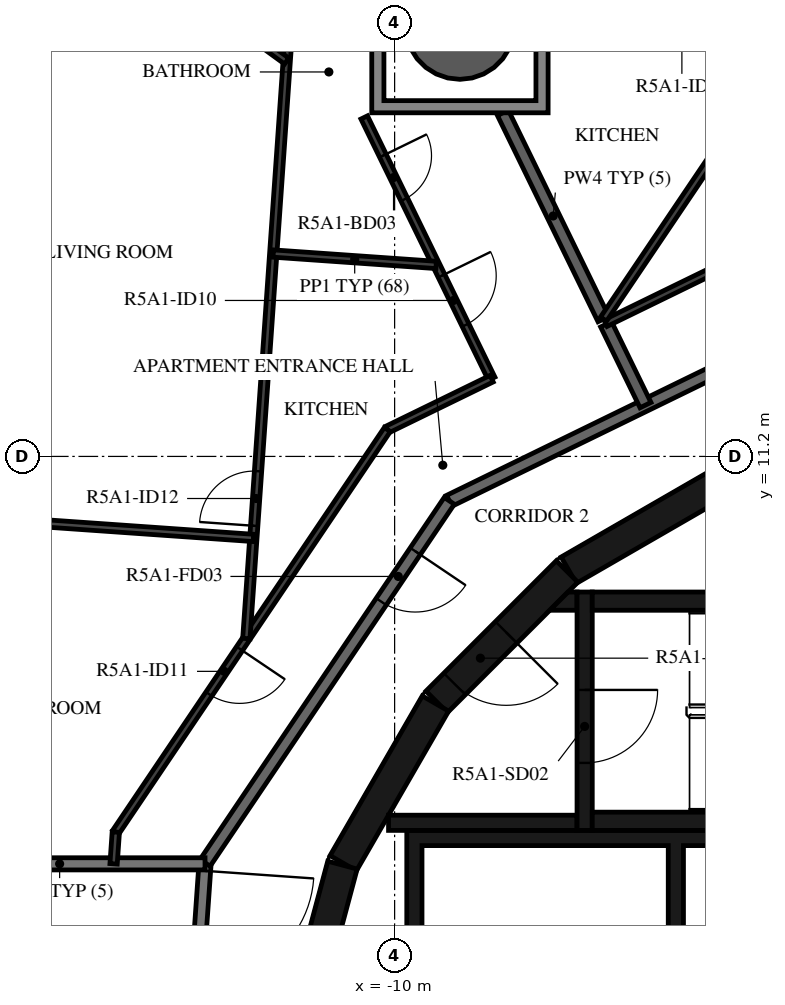
"""IFC4 building model, lengths in metres.
Left out: names, types, materials, properties, quantities, classifications, styles, units other than length and angle.
Written with IfcOpenShell. Run it as: python <this file> out.ifc"""

import sys

from ifc_helpers import new_model, si_unit, direction, frame, frame_2d, origin, origin_2d, place, context, subcontext, project, spatial, polyline, rectangle, hollow_circle, outline, extrude, element, fill, save


model = new_model("IFC4")
c1 = context("Model", 3, precision=1e-05, world=origin(), true_north=direction((0.0, 1.0)))
c2 = subcontext(c1, "Body", "Model", "MODEL_VIEW")
j1 = project(units=[si_unit("LENGTHUNIT", "METRE"), si_unit("PLANEANGLEUNIT", "RADIAN")], contexts=[c1])
p1 = place(None, origin())
s1 = spatial("IfcSite", under=j1, at=p1, CompositionType="ELEMENT")
p2 = place(p1, origin())
s2 = spatial("IfcBuilding", under=s1, at=p2, CompositionType="ELEMENT")
p3 = place(p2, frame((0.0, 0.0, 191.9)))
s3 = spatial("IfcBuildingStorey", under=s2, at=p3, CompositionType="ELEMENT", Elevation=191.9)
p4 = place(p3, frame((-8.926, 18.301, -0.38), z_axis=(0.0, 0.0, 1.0), x_axis=(1.0, 0.0, 0.0)))
e1 = element("IfcColumn", 1, at=p4, inside=s3, PredefinedType="COLUMN", context=c2, shape_type="SweptSolid", body=[
    extrude(hollow_circle(Radius=0.9, WallThickness=0.04, at=origin_2d()), origin(), (0.0, 0.0, 1.0), 3.5),
])
p5 = place(p3, frame((-4.51, 10.845, 0.0), z_axis=(0.0, 0.0, 1.0), x_axis=(-0.865975092491, -0.500087131594, 0.0)))
e2 = element("IfcWall", 2, at=p5, inside=s3, PredefinedType="SHEAR", context=c2, shape_type="SweptSolid", body=[
    extrude(rectangle(XDim=3.033, YDim=0.5, at=frame_2d((1.516, 0.0))), origin(), (0.0, 0.0, 1.0), 3.12),
])
p6 = place(p3, frame((-7.164, 9.308, 0.0), z_axis=(0.0, 0.0, 1.0), x_axis=(-0.707106781187, -0.707106781187, 0.0)))
e3 = element("IfcWall", 3, at=p6, inside=s3, PredefinedType="SHEAR", context=c2, shape_type="SweptSolid", body=[
    extrude(rectangle(XDim=3.032, YDim=0.5, at=frame_2d((1.516, 0.0))), origin(), (0.0, 0.0, 1.0), 3.12),
])
p7 = place(p6, frame((1.416, 0.0, 0.0)))
e4 = element("IfcOpeningElement", 4, at=p7, cuts=e3, PredefinedType="OPENING", context=c2, shape_type="SweptSolid", body=[
    extrude(rectangle(XDim=1.2, YDim=2.1, at=frame_2d((0.6, 1.05))), frame((0.0, 0.26, 0.0), z_axis=(0.0, -1.0, 0.0), x_axis=(1.0, 0.0, 0.0)), (0.0, 0.0, 1.0), 0.52),
])
for number, where, z_axis, x_axis in (
    (5, (-9.329, 7.137, 0.0), (0.0, 0.0, 1.0), (-0.5, -0.866, 0.0)),
    (6, (-10.858, 4.479, 0.0), (0.0, 0.0, 1.0), (-0.259, -0.966, 0.0)),
):
    element("IfcWall", number, at=place(p3, frame(where, z_axis=z_axis, x_axis=x_axis)), inside=s3, PredefinedType="SHEAR", context=c2, shape_type="SweptSolid", body=[
        extrude(rectangle(XDim=3.033, YDim=0.5, at=frame_2d((1.516, 0.0))), origin(), (0.0, 0.0, 1.0), 3.12),
    ])
for number, where, z_axis, x_axis in (
    (7, (-6.75, 5.2, 0.0), (0.0, 0.0, 1.0), (1.0, 0.0, 0.0)),
    (8, (-6.75, 8.82, 0.0), (0.0, 0.0, 1.0), (1.0, 0.0, 0.0)),
):
    element("IfcWall", number, at=place(p3, frame(where, z_axis=z_axis, x_axis=x_axis)), inside=s3, PredefinedType="SHEAR", context=c2, shape_type="SweptSolid", body=[
        extrude(rectangle(XDim=6.75, YDim=0.3, at=frame_2d((3.375, 0.0))), origin(), (0.0, 0.0, 1.0), 3.12),
    ])
p8 = place(p3, frame((-6.875, 8.97, 0.0), z_axis=(0.0, 0.0, 1.0), x_axis=(0.0, -1.0, 0.0)))
e9 = element("IfcWall", 9, at=p8, inside=s3, PredefinedType="SHEAR", context=c2, shape_type="SweptSolid", body=[
    extrude(rectangle(XDim=3.92, YDim=0.25, at=frame_2d((1.96, 0.0))), origin(), (0.0, 0.0, 1.0), 3.12),
])
p9 = place(p8, frame((1.61, 0.0, 0.0)))
e10 = element("IfcOpeningElement", 10, at=p9, cuts=e9, PredefinedType="OPENING", context=c2, shape_type="SweptSolid", body=[
    extrude(rectangle(XDim=1.2, YDim=2.1, at=frame_2d((0.6, 1.05))), frame((0.0, 0.135, 0.0), z_axis=(0.0, -1.0, 0.0), x_axis=(1.0, 0.0, 0.0)), (0.0, 0.0, 1.0), 0.27),
])
p10 = place(p3, frame((-7.0, 5.175, 0.0), z_axis=(0.0, 0.0, 1.0), x_axis=(-1.0, 0.0, 0.0)))
e11 = element("IfcWall", 11, at=p10, inside=s3, PredefinedType="SHEAR", context=c2, shape_type="SweptSolid", body=[
    extrude(rectangle(XDim=3.1, YDim=0.25, at=frame_2d((1.55, 0.0))), origin(), (0.0, 0.0, 1.0), 3.12),
])
p11 = place(p3, origin())
e12 = element("IfcWall", 12, at=p11, inside=s3, PredefinedType="SHEAR", context=c2, shape_type="SweptSolid", body=[
    extrude(outline(polyline([(-7.148, 8.97), (-7.0, 8.97), (-7.0, 8.67), (-7.448, 8.67), (-7.148, 8.97)])), origin(), (0.0, 0.0, 1.0), 3.12),
])
p12 = place(p3, origin())
e13 = element("IfcWall", 13, at=p12, inside=s3, PredefinedType="SHEAR", context=c2, shape_type="SweptSolid", body=[
    extrude(outline(polyline([(-9.55, 4.8), (-5.5, 4.8), (-5.5, 1.9), (-5.25, 1.9), (-5.25, 4.8), (-1.2, 4.8), (-1.2, 1.9), (-0.95, 1.9), (-0.95, 4.8), (0.95, 4.8), (0.95, 1.9), (1.2, 1.9), (1.2, 4.8), (3.1, 4.8), (3.1, 1.9), (3.35, 1.9), (3.35, 4.8), (5.25, 4.8), (5.25, 1.9), (5.5, 1.9), (5.5, 4.8), (7.4, 4.8), (7.4, 1.9), (7.65, 1.9), (7.65, 4.8), (9.55, 4.8), (9.55, 1.9), (9.8, 1.9), (9.8, 4.8), (9.8, 5.05), (-9.8, 5.05), (-9.8, 4.8), (-9.8, 1.9), (-9.55, 1.9), (-9.55, 4.8)])), origin(), (0.0, 0.0, 1.0), 3.12),
])
p13 = place(p3, frame((-13.118, 4.5, 0.0), z_axis=(0.0, 0.0, 1.0), x_axis=(-0.069746872611, -0.99756472159, 0.0)))
e14 = element("IfcWall", 14, at=p13, inside=s3, PredefinedType="STANDARD", context=c2, shape_type="SweptSolid", body=[
    extrude(rectangle(XDim=3.574, YDim=0.2, at=frame_2d((1.787, 0.0))), origin(), (0.0, 0.0, 1.0), 3.12),
])
p14 = place(p13, frame((0.115, 0.0, 0.0)))
e15 = element("IfcOpeningElement", 15, at=p14, cuts=e14, PredefinedType="OPENING", context=c2, shape_type="SweptSolid", body=[
    extrude(rectangle(XDim=1.8, YDim=2.1, at=frame_2d((0.9, 1.05))), frame((0.0, 0.11, 0.0), z_axis=(0.0, -1.0, 0.0), x_axis=(1.0, 0.0, 0.0)), (0.0, 0.0, 1.0), 0.22),
])
p15 = place(p3, frame((-2.647, 13.618, 0.0), z_axis=(0.0, 0.0, 1.0), x_axis=(-0.898796543751, -0.438366026218, 0.0)))
e16 = element("IfcWall", 16, at=p15, inside=s3, PredefinedType="STANDARD", context=c2, shape_type="SweptSolid", body=[
    extrude(rectangle(XDim=7.181, YDim=0.2, at=frame_2d((3.591, 0.0))), origin(), (0.0, 0.0, 1.0), 3.12),
])
p16 = place(p3, frame((-9.101, 10.47, 0.0), z_axis=(0.0, 0.0, 1.0), x_axis=(-0.559195469534, -0.829035841718, 0.0)))
e17 = element("IfcWall", 17, at=p16, inside=s3, PredefinedType="STANDARD", context=c2, shape_type="SweptSolid", body=[
    extrude(rectangle(XDim=7.181, YDim=0.2, at=frame_2d((3.591, 0.0))), origin(), (0.0, 0.0, 1.0), 3.12),
])
p17 = place(p16, frame((1.0, 0.0, 0.0)))
e18 = element("IfcOpeningElement", 18, at=p17, cuts=e17, PredefinedType="OPENING", context=c2, shape_type="SweptSolid", body=[
    extrude(rectangle(XDim=1.0, YDim=2.1, at=frame_2d((0.5, 1.05))), frame((0.0, 0.11, 0.0), z_axis=(0.0, -1.0, 0.0), x_axis=(1.0, 0.0, 0.0)), (0.0, 0.0, 1.0), 0.22),
])
p18 = place(p3, frame((-13.118, 4.5, 0.0), z_axis=(0.0, 0.0, 1.0), x_axis=(-1.0, 0.0, 0.0)))
e19 = element("IfcWall", 19, at=p18, inside=s3, PredefinedType="STANDARD", context=c2, shape_type="SweptSolid", body=[
    extrude(rectangle(XDim=4.782, YDim=0.2, at=frame_2d((2.391, 0.0))), origin(), (0.0, 0.0, 1.0), 3.12),
])
p19 = place(p3, frame((-6.522, 13.373, 0.0), z_axis=(0.0, 0.0, 1.0), x_axis=(0.438277270821, -0.8988398266, 0.0)))
e20 = element("IfcWall", 20, at=p19, inside=s3, PredefinedType="STANDARD", context=c2, shape_type="SweptSolid", body=[
    extrude(rectangle(XDim=1.479, YDim=0.2, at=frame_2d((0.74, 0.0))), origin(), (0.0, 0.0, 1.0), 3.12),
])
p20 = place(p3, frame((-8.219, 16.851, 0.0), z_axis=(0.0, 0.0, 1.0), x_axis=(0.438291091101, -0.898833087654, 0.0)))
e21 = element("IfcWall", 21, at=p20, inside=s3, PredefinedType="STANDARD", context=c2, shape_type="SweptSolid", body=[
    extrude(rectangle(XDim=3.774, YDim=0.2, at=frame_2d((1.887, 0.0))), origin(), (0.0, 0.0, 1.0), 3.12),
])
p21 = place(p3, frame((-2.943, 15.142, 0.0), z_axis=(0.0, 0.0, 1.0), x_axis=(-0.89881075705, -0.438336883014, 0.0)))
e22 = element("IfcWall", 22, at=p21, inside=s3, PredefinedType="PARTITIONING", context=c2, shape_type="SweptSolid", body=[
    extrude(rectangle(XDim=3.992, YDim=0.12, at=frame_2d((1.996, 0.0))), origin(), (0.0, 0.0, 1.0), 3.12),
])
p22 = place(p3, frame((-7.476, 19.735, 0.0), z_axis=(0.0, 0.0, 1.0), x_axis=(0.829035412992, -0.559196105142, 0.0)))
e23 = element("IfcWall", 23, at=p22, inside=s3, PredefinedType="PARTITIONING", context=c2, shape_type="SweptSolid", body=[
    extrude(rectangle(XDim=8.531, YDim=0.12, at=frame_2d((4.266, 0.0))), origin(), (0.0, 0.0, 1.0), 3.12),
])
p23 = place(p22, frame((2.204, 0.0, 0.0)))
e24 = element("IfcOpeningElement", 24, at=p23, cuts=e23, PredefinedType="OPENING", context=c2, shape_type="SweptSolid", body=[
    extrude(rectangle(XDim=0.9, YDim=2.1, at=frame_2d((0.45, 1.05))), frame((0.0, 0.07, 0.0), z_axis=(0.0, -1.0, 0.0), x_axis=(1.0, 0.0, 0.0)), (0.0, 0.0, 1.0), 0.14),
])
p24 = place(p3, frame((-3.939, 17.35, 0.0), z_axis=(0.0, 0.0, 1.0), x_axis=(-0.559193216274, -0.829037361566, 0.0)))
e25 = element("IfcWall", 25, at=p24, inside=s3, PredefinedType="PARTITIONING", context=c2, shape_type="SweptSolid", body=[
    extrude(rectangle(XDim=4.694, YDim=0.12, at=frame_2d((2.347, 0.0))), origin(), (0.0, 0.0, 1.0), 3.12),
])
p25 = place(p3, frame((-10.5, 16.775, 0.0), z_axis=(0.0, 0.0, 1.0), x_axis=(0.438345136783, -0.898806731761, 0.0)))
e26 = element("IfcWall", 26, at=p25, inside=s3, PredefinedType="PARTITIONING", context=c2, shape_type="SweptSolid", body=[
    extrude(rectangle(XDim=4.78, YDim=0.12, at=frame_2d((2.39, 0.0))), origin(), (0.0, 0.0, 1.0), 3.12),
])
p26 = place(p25, frame((0.7, 0.0, 0.0)))
e27 = element("IfcOpeningElement", 27, at=p26, cuts=e26, PredefinedType="OPENING", context=c2, shape_type="SweptSolid", body=[
    extrude(rectangle(XDim=0.8, YDim=2.1, at=frame_2d((0.4, 1.05))), frame((0.0, 0.07, 0.0), z_axis=(0.0, -1.0, 0.0), x_axis=(1.0, 0.0, 0.0)), (0.0, 0.0, 1.0), 0.14),
])
p27 = place(p25, frame((2.899, 0.0, 0.0)))
e28 = element("IfcOpeningElement", 28, at=p27, cuts=e26, PredefinedType="OPENING", context=c2, shape_type="SweptSolid", body=[
    extrude(rectangle(XDim=0.9, YDim=2.1, at=frame_2d((0.45, 1.05))), frame((0.0, 0.07, 0.0), z_axis=(0.0, -1.0, 0.0), x_axis=(1.0, 0.0, 0.0)), (0.0, 0.0, 1.0), 0.14),
])
p28 = place(p3, frame((-8.405, 12.479, 0.0), z_axis=(0.0, 0.0, 1.0), x_axis=(-0.898784427692, -0.438390867307, 0.0)))
e29 = element("IfcWall", 29, at=p28, inside=s3, PredefinedType="PARTITIONING", context=c2, shape_type="SweptSolid", body=[
    extrude(rectangle(XDim=1.908, YDim=0.12, at=frame_2d((0.954, 0.0))), origin(), (0.0, 0.0, 1.0), 3.12),
])
p29 = place(p3, frame((-10.12, 11.642, 0.0), z_axis=(0.0, 0.0, 1.0), x_axis=(-0.55920080659, -0.829032241779, 0.0)))
e30 = element("IfcWall", 30, at=p29, inside=s3, PredefinedType="PARTITIONING", context=c2, shape_type="SweptSolid", body=[
    extrude(rectangle(XDim=7.985, YDim=0.12, at=frame_2d((3.992, 0.0))), origin(), (0.0, 0.0, 1.0), 3.12),
])
p30 = place(p29, frame((4.346, 0.0, 0.0)))
e31 = element("IfcOpeningElement", 31, at=p30, cuts=e30, PredefinedType="OPENING", context=c2, shape_type="SweptSolid", body=[
    extrude(rectangle(XDim=0.9, YDim=2.1, at=frame_2d((0.45, 1.05))), frame((0.0, 0.07, 0.0), z_axis=(0.0, -1.0, 0.0), x_axis=(1.0, 0.0, 0.0)), (0.0, 0.0, 1.0), 0.14),
])
p31 = place(p3, frame((-14.585, 5.022, 0.0), z_axis=(0.0, 0.0, 1.0), x_axis=(-0.069490327804, -0.997582625321, 0.0)))
e32 = element("IfcWall", 32, at=p31, inside=s3, PredefinedType="PARTITIONING", context=c2, shape_type="SweptSolid", body=[
    extrude(rectangle(XDim=0.523, YDim=0.12, at=frame_2d((0.262, 0.0))), origin(), (0.0, 0.0, 1.0), 3.12),
])
p32 = place(p3, frame((-12.439, 8.204, 0.0), z_axis=(0.0, 0.0, 1.0), x_axis=(0.069750037523, 0.997564500303, 0.0)))
e33 = element("IfcWall", 33, at=p32, inside=s3, PredefinedType="PARTITIONING", context=c2, shape_type="SweptSolid", body=[
    extrude(rectangle(XDim=10.014, YDim=0.12, at=frame_2d((5.007, 0.0))), origin(), (0.0, 0.0, 1.0), 3.12),
])
p33 = place(p32, frame((1.859, 0.0, 0.0)))
e34 = element("IfcOpeningElement", 34, at=p33, cuts=e33, PredefinedType="OPENING", context=c2, shape_type="SweptSolid", body=[
    extrude(rectangle(XDim=0.9, YDim=2.1, at=frame_2d((0.45, 1.05))), frame((0.0, 0.07, 0.0), z_axis=(0.0, -1.0, 0.0), x_axis=(1.0, 0.0, 0.0)), (0.0, 0.0, 1.0), 0.14),
])
p34 = place(p3, frame((-16.395, 21.061, 0.0), z_axis=(0.0, 0.0, 1.0), x_axis=(0.808810002497, -0.58807004673, 0.0)))
e35 = element("IfcWall", 35, at=p34, inside=s3, PredefinedType="PARTITIONING", context=c2, shape_type="SweptSolid", body=[
    extrude(rectangle(XDim=5.713, YDim=0.12, at=frame_2d((2.856, 0.0))), origin(), (0.0, 0.0, 1.0), 3.12),
])
p35 = place(p34, frame((0.2, 0.0, 0.0)))
e36 = element("IfcOpeningElement", 36, at=p35, cuts=e35, PredefinedType="OPENING", context=c2, shape_type="SweptSolid", body=[
    extrude(rectangle(XDim=0.9, YDim=2.1, at=frame_2d((0.45, 1.05))), frame((0.0, 0.07, 0.0), z_axis=(0.0, -1.0, 0.0), x_axis=(1.0, 0.0, 0.0)), (0.0, 0.0, 1.0), 0.14),
])
p36 = place(p3, frame((-11.996, 14.536, 0.0), z_axis=(0.0, 0.0, 1.0), x_axis=(0.997565991425, -0.069728708231, 0.0)))
e37 = element("IfcWall", 37, at=p36, inside=s3, PredefinedType="PARTITIONING", context=c2, shape_type="SweptSolid", body=[
    extrude(rectangle(XDim=2.686, YDim=0.12, at=frame_2d((1.343, 0.0))), origin(), (0.0, 0.0, 1.0), 3.12),
])
p37 = place(p3, frame((-17.51, 10.222, 0.0), z_axis=(0.0, 0.0, 1.0), x_axis=(0.997563184303, -0.069768856397, 0.0)))
e38 = element("IfcWall", 38, at=p37, inside=s3, PredefinedType="PARTITIONING", context=c2, shape_type="SweptSolid", body=[
    extrude(rectangle(XDim=5.2, YDim=0.12, at=frame_2d((2.6, 0.0))), origin(), (0.0, 0.0, 1.0), 2.73),
])
p38 = place(p3, origin())
e39 = element("IfcWall", 39, at=p38, inside=s3, PredefinedType="STANDARD", context=c2, shape_type="SweptSolid", body=[
    extrude(outline(polyline([(-7.476, 19.751), (-7.476, 16.851), (-10.376, 16.851), (-10.376, 19.751), (-7.476, 19.751)]), holes=[polyline([(-10.176, 17.051), (-7.676, 17.051), (-7.676, 19.551), (-10.176, 19.551), (-10.176, 17.051)])]), origin(), (0.0, 0.0, 1.0), 3.12),
])
p39 = place(p9, origin())
e40 = element("IfcDoor", 40, at=p39, inside=s3, OperationType="SINGLE_SWING_LEFT", PredefinedType="DOOR", context=c2, shape_type="SweptSolid", body=[
    extrude(rectangle(XDim=1.2, YDim=2.1, at=frame_2d((0.6, 1.05))), frame((0.0, 0.025, 0.0), z_axis=(0.0, -1.0, 0.0), x_axis=(1.0, 0.0, 0.0)), (0.0, 0.0, 1.0), 0.05),
])
fill(e10, e40)
p40 = place(p7, origin())
e41 = element("IfcDoor", 41, at=p40, inside=s3, OperationType="SINGLE_SWING_RIGHT", PredefinedType="DOOR", context=c2, shape_type="SweptSolid", body=[
    extrude(rectangle(XDim=1.2, YDim=2.1, at=frame_2d((0.6, 1.05))), frame((0.0, 0.025, 0.0), z_axis=(0.0, -1.0, 0.0), x_axis=(1.0, 0.0, 0.0)), (0.0, 0.0, 1.0), 0.05),
])
fill(e4, e41)
p41 = place(p17, origin())
e42 = element("IfcDoor", 42, at=p41, inside=s3, OperationType="SINGLE_SWING_LEFT", PredefinedType="DOOR", context=c2, shape_type="SweptSolid", body=[
    extrude(rectangle(XDim=1.0, YDim=2.1, at=frame_2d((0.5, 1.05))), frame((0.0, 0.025, 0.0), z_axis=(0.0, -1.0, 0.0), x_axis=(1.0, 0.0, 0.0)), (0.0, 0.0, 1.0), 0.05),
])
fill(e18, e42)
p42 = place(p26, origin())
e43 = element("IfcDoor", 43, at=p42, inside=s3, OperationType="SINGLE_SWING_LEFT", PredefinedType="DOOR", context=c2, shape_type="SweptSolid", body=[
    extrude(rectangle(XDim=0.8, YDim=2.1, at=frame_2d((0.4, 1.05))), frame((0.0, 0.025, 0.0), z_axis=(0.0, -1.0, 0.0), x_axis=(1.0, 0.0, 0.0)), (0.0, 0.0, 1.0), 0.05),
])
fill(e27, e43)
p43 = place(p27, origin())
e44 = element("IfcDoor", 44, at=p43, inside=s3, OperationType="SINGLE_SWING_LEFT", PredefinedType="DOOR", context=c2, shape_type="SweptSolid", body=[
    extrude(rectangle(XDim=0.9, YDim=2.1, at=frame_2d((0.45, 1.05))), frame((0.0, 0.025, 0.0), z_axis=(0.0, -1.0, 0.0), x_axis=(1.0, 0.0, 0.0)), (0.0, 0.0, 1.0), 0.05),
])
fill(e28, e44)
p44 = place(p30, origin())
e45 = element("IfcDoor", 45, at=p44, inside=s3, OperationType="SINGLE_SWING_LEFT", PredefinedType="DOOR", context=c2, shape_type="SweptSolid", body=[
    extrude(rectangle(XDim=0.9, YDim=2.1, at=frame_2d((0.45, 1.05))), frame((0.0, 0.025, 0.0), z_axis=(0.0, -1.0, 0.0), x_axis=(1.0, 0.0, 0.0)), (0.0, 0.0, 1.0), 0.05),
])
fill(e31, e45)
p45 = place(p33, origin())
e46 = element("IfcDoor", 46, at=p45, inside=s3, OperationType="SINGLE_SWING_LEFT", PredefinedType="DOOR", context=c2, shape_type="SweptSolid", body=[
    extrude(rectangle(XDim=0.9, YDim=2.1, at=frame_2d((0.45, 1.05))), frame((0.0, 0.025, 0.0), z_axis=(0.0, -1.0, 0.0), x_axis=(1.0, 0.0, 0.0)), (0.0, 0.0, 1.0), 0.05),
])
fill(e34, e46)
p46 = place(p14, origin())
e47 = element("IfcDoor", 47, at=p46, inside=s3, OperationType="DOUBLE_DOOR_SINGLE_SWING", PredefinedType="DOOR", context=c2, shape_type="SweptSolid", body=[
    extrude(rectangle(XDim=1.8, YDim=2.1, at=frame_2d((0.9, 1.05))), frame((0.0, 0.025, 0.0), z_axis=(0.0, -1.0, 0.0), x_axis=(1.0, 0.0, 0.0)), (0.0, 0.0, 1.0), 0.05),
])
fill(e15, e47)
save(model, sys.argv[1])
